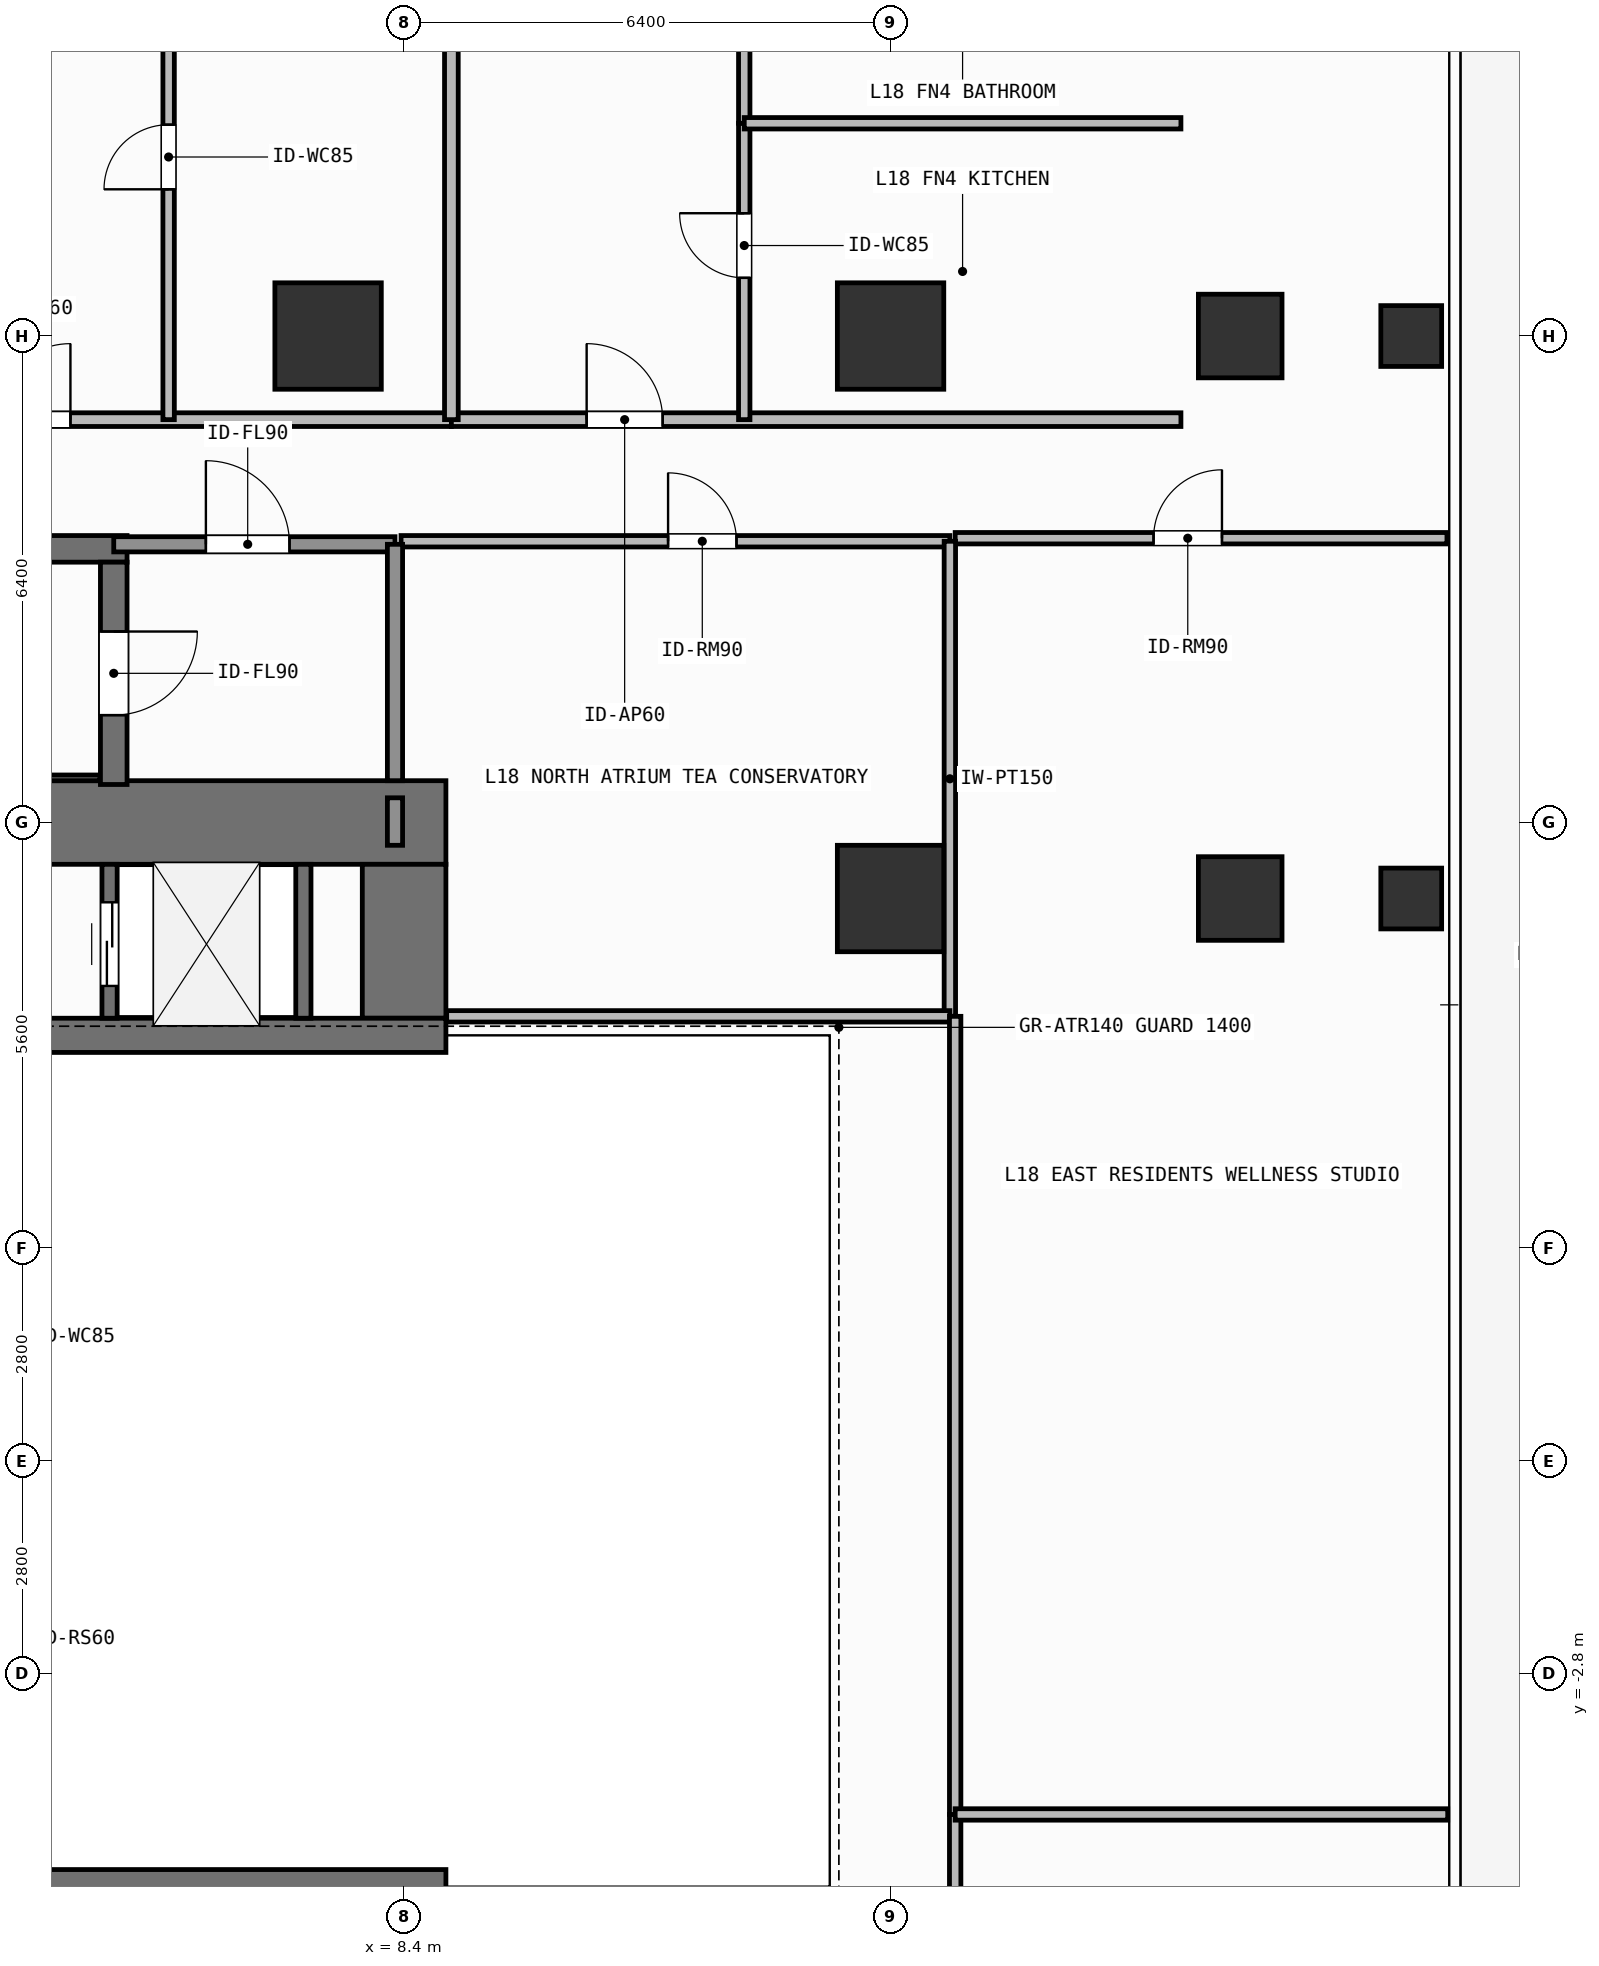
"""IFC4 building model, lengths in metres.
Left out: names, types, materials, properties, quantities, classifications, styles, units other than length and angle.
Written with IfcOpenShell. Run it as: python <this file> out.ifc"""

import sys

from ifc_helpers import new_model, si_unit, direction, frame, frame_2d, origin, origin_2d, place, context, subcontext, project, spatial, rectangle, hollow_rectangle, extrude, element, fill, save


model = new_model("IFC4")
c1 = context("Model", 3, precision=1e-05, world=origin(), true_north=direction((0.0, 1.0)))
c2 = subcontext(c1, "Body", "Model", "MODEL_VIEW")
j1 = project(units=[si_unit("LENGTHUNIT", "METRE"), si_unit("PLANEANGLEUNIT", "RADIAN")], contexts=[c1])
p1 = place(None, origin())
s1 = spatial("IfcSite", under=j1, at=p1, CompositionType="ELEMENT")
p2 = place(p1, origin())
s2 = spatial("IfcBuilding", under=s1, at=p2, CompositionType="ELEMENT")
p3 = place(p2, frame((0.0, 0.0, 69.6)))
s3 = spatial("IfcBuildingStorey", under=s2, at=p3, CompositionType="ELEMENT", Elevation=69.6)
p4 = place(p3, frame((-7.55, 8.4, 0.0), z_axis=(0.0, 0.0, 1.0), x_axis=(1.0, 0.0, 0.0)))
e1 = element("IfcWall", 1, at=p4, inside=s3, PredefinedType="SHEAR", context=c2, shape_type="SweptSolid", body=[
    extrude(rectangle(XDim=16.5, YDim=1.1, at=frame_2d((8.25, 0.0))), origin(), (0.0, 0.0, 1.0), 3.9),
])
p5 = place(p3, frame((8.4, 5.825, 0.0), z_axis=(0.0, 0.0, 1.0), x_axis=(0.0, 1.0, 0.0)))
e2 = element("IfcWall", 2, at=p5, inside=s3, PredefinedType="SHEAR", context=c2, shape_type="SweptSolid", body=[
    extrude(rectangle(XDim=2.025, YDim=1.1, at=frame_2d((1.013, 0.0))), origin(), (0.0, 0.0, 1.0), 3.9),
])
for number, where, z_axis, x_axis in (
    (3, (3.045, -5.6, 0.0), (0.0, 0.0, 1.0), (1.0, 0.0, 0.0)),
    (4, (3.045, 5.6, 0.0), (0.0, 0.0, 1.0), (1.0, 0.0, 0.0)),
):
    element("IfcWall", number, at=place(p3, frame(where, z_axis=z_axis, x_axis=x_axis)), inside=s3, PredefinedType="SHEAR", context=c2, shape_type="SweptSolid", body=[
        extrude(rectangle(XDim=5.905, YDim=0.45, at=frame_2d((2.953, 0.0))), origin(), (0.0, 0.0, 1.0), 3.9),
    ])
p6 = place(p3, frame((-2.555, 12.0, 0.0), z_axis=(0.0, 0.0, 1.0), x_axis=(1.0, 0.0, 0.0)))
e5 = element("IfcWall", 5, at=p6, inside=s3, PredefinedType="SHEAR", context=c2, shape_type="SweptSolid", body=[
    extrude(rectangle(XDim=7.31, YDim=0.35, at=frame_2d((3.655, 0.0))), origin(), (0.0, 0.0, 1.0), 3.9),
])
p7 = place(p3, frame((-2.2, 8.988, 0.0), z_axis=(0.0, 0.0, 1.0), x_axis=(1.0, 0.0, 0.0)))
e6 = element("IfcWall", 6, at=p7, inside=s3, PredefinedType="SHEAR", context=c2, shape_type="SweptSolid", body=[
    extrude(rectangle(XDim=6.6, YDim=0.075, at=frame_2d((3.3, 0.0))), origin(), (0.0, 0.0, 1.0), 3.9),
])
p8 = place(p3, frame((4.58, 11.825, 0.0), z_axis=(0.0, 0.0, 1.0), x_axis=(0.0, -1.0, 0.0)))
e7 = element("IfcWall", 7, at=p8, inside=s3, PredefinedType="SHEAR", context=c2, shape_type="SweptSolid", body=[
    extrude(rectangle(XDim=2.925, YDim=0.35, at=frame_2d((1.462, 0.0))), origin(), (0.0, 0.0, 1.0), 3.9),
])
p9 = place(p8, frame((0.913, 0.0, 0.0)))
e8 = element("IfcOpeningElement", 8, at=p9, cuts=e7, PredefinedType="OPENING", context=c2, shape_type="SweptSolid", body=[
    extrude(rectangle(XDim=1.1, YDim=2.15, at=frame_2d((0.55, 1.075))), frame((0.0, 0.185, 0.0), z_axis=(0.0, -1.0, 0.0), x_axis=(1.0, 0.0, 0.0)), (0.0, 0.0, 1.0), 0.37),
])
for number, where, z_axis, x_axis in (
    (9, (7.4, 14.8, 0.0), (0.0, 0.0, 1.0), (1.0, 0.0, 0.0)),
    (10, (14.8, 14.8, 0.0), (0.0, 0.0, 1.0), (1.0, 0.0, 0.0)),
    (11, (14.8, 7.4, 0.0), (0.0, 0.0, 1.0), (1.0, 0.0, 0.0)),
):
    element("IfcColumn", number, at=place(p3, frame(where, z_axis=z_axis, x_axis=x_axis)), inside=s3, PredefinedType="COLUMN", context=c2, shape_type="SweptSolid", body=[
        extrude(rectangle(XDim=1.4, YDim=1.4, at=origin_2d()), origin(), (0.0, 0.0, 1.0), 3.9),
    ])
for number, where, z_axis, x_axis in (
    (12, (19.4, 7.4, 0.0), (0.0, 0.0, 1.0), (1.0, 0.0, 0.0)),
    (13, (19.4, 14.8, 0.0), (0.0, 0.0, 1.0), (1.0, 0.0, 0.0)),
):
    element("IfcColumn", number, at=place(p3, frame(where, z_axis=z_axis, x_axis=x_axis)), inside=s3, PredefinedType="COLUMN", context=c2, shape_type="SweptSolid", body=[
        extrude(rectangle(XDim=1.1, YDim=1.1, at=origin_2d()), origin(), (0.0, 0.0, 1.0), 3.9),
    ])
for number, where, z_axis, x_axis in (
    (14, (21.65, 7.4, 0.0), (0.0, 0.0, 1.0), (1.0, 0.0, 0.0)),
    (15, (21.65, 14.8, 0.0), (0.0, 0.0, 1.0), (1.0, 0.0, 0.0)),
):
    element("IfcColumn", number, at=place(p3, frame(where, z_axis=z_axis, x_axis=x_axis)), inside=s3, PredefinedType="COLUMN", context=c2, shape_type="SweptSolid", body=[
        extrude(hollow_rectangle(XDim=0.8, YDim=0.8, WallThickness=0.036, at=origin_2d()), origin(), (0.0, 0.0, 1.0), 3.9),
    ])
p10 = place(p3, frame((4.525, 5.825, 0.0), z_axis=(0.0, 0.0, 1.0), x_axis=(0.0, 1.0, 0.0)))
e16 = element("IfcWall", 16, at=p10, inside=s3, PredefinedType="SHEAR", context=c2, shape_type="SweptSolid", body=[
    extrude(rectangle(XDim=2.025, YDim=0.2, at=frame_2d((1.013, 0.0))), origin(), (0.0, 0.0, 1.0), 3.68),
])
p11 = place(p10, frame((0.425, 0.0, 0.0)))
e17 = element("IfcOpeningElement", 17, at=p11, cuts=e16, PredefinedType="OPENING", context=c2, shape_type="SweptSolid", body=[
    extrude(rectangle(XDim=1.1, YDim=2.2, at=frame_2d((0.55, 1.1))), frame((0.0, 0.11, 0.0), z_axis=(0.0, -1.0, 0.0), x_axis=(1.0, 0.0, 0.0)), (0.0, 0.0, 1.0), 0.22),
])
p12 = place(p3, frame((7.075, 5.825, 0.0), z_axis=(0.0, 0.0, 1.0), x_axis=(0.0, 1.0, 0.0)))
e18 = element("IfcWall", 18, at=p12, inside=s3, PredefinedType="SHEAR", context=c2, shape_type="SweptSolid", body=[
    extrude(rectangle(XDim=2.025, YDim=0.2, at=frame_2d((1.013, 0.0))), origin(), (0.0, 0.0, 1.0), 3.68),
])
p13 = place(p3, frame((4.58, 12.06, 0.0), z_axis=(0.0, 0.0, 1.0), x_axis=(1.0, 0.0, 0.0)))
e19 = element("IfcWall", 19, at=p13, inside=s3, PredefinedType="SOLIDWALL", context=c2, shape_type="SweptSolid", body=[
    extrude(rectangle(XDim=3.7, YDim=0.2, at=frame_2d((1.85, 0.0))), origin(), (0.0, 0.0, 1.0), 3.68),
])
p14 = place(p13, frame((1.212, 0.0, 0.0)))
e20 = element("IfcOpeningElement", 20, at=p14, cuts=e19, PredefinedType="OPENING", context=c2, shape_type="SweptSolid", body=[
    extrude(rectangle(XDim=1.1, YDim=2.15, at=frame_2d((0.55, 1.075))), frame((0.0, 0.11, 0.0), z_axis=(0.0, -1.0, 0.0), x_axis=(1.0, 0.0, 0.0)), (0.0, 0.0, 1.0), 0.22),
])
p15 = place(p3, frame((8.36, 12.1, 0.0), z_axis=(0.0, 0.0, 1.0), x_axis=(1.0, 0.0, 0.0)))
e21 = element("IfcWall", 21, at=p15, inside=s3, PredefinedType="PARTITIONING", context=c2, shape_type="SweptSolid", body=[
    extrude(rectangle(XDim=7.22, YDim=0.15, at=frame_2d((3.61, 0.0))), origin(), (0.0, 0.0, 1.0), 3.68),
])
p16 = place(p15, frame((3.513, 0.0, 0.0)))
e22 = element("IfcOpeningElement", 22, at=p16, cuts=e21, PredefinedType="OPENING", context=c2, shape_type="SweptSolid", body=[
    extrude(rectangle(XDim=0.9, YDim=2.1, at=frame_2d((0.45, 1.05))), frame((0.0, 0.085, 0.0), z_axis=(0.0, -1.0, 0.0), x_axis=(1.0, 0.0, 0.0)), (0.0, 0.0, 1.0), 0.17),
])
p17 = place(p3, frame((-2.9, 13.7, 0.0), z_axis=(0.0, 0.0, 1.0), x_axis=(1.0, 0.0, 0.0)))
e23 = element("IfcWall", 23, at=p17, inside=s3, PredefinedType="PARTITIONING", context=c2, shape_type="SweptSolid", body=[
    extrude(rectangle(XDim=11.922, YDim=0.18, at=frame_2d((5.961, 0.0))), origin(), (0.0, 0.0, 1.0), 3.68),
])
p18 = place(p17, frame((5.91, 0.0, 0.0)))
e24 = element("IfcOpeningElement", 24, at=p18, cuts=e23, PredefinedType="OPENING", context=c2, shape_type="SweptSolid", body=[
    extrude(rectangle(XDim=1.0, YDim=2.2, at=frame_2d((0.5, 1.1))), frame((0.0, 0.1, 0.0), z_axis=(0.0, -1.0, 0.0), x_axis=(1.0, 0.0, 0.0)), (0.0, 0.0, 1.0), 0.2),
])
p19 = place(p3, frame((5.302, 13.7, 0.0), z_axis=(0.0, 0.0, 1.0), x_axis=(0.0, 1.0, 0.0)))
e25 = element("IfcWall", 25, at=p19, inside=s3, PredefinedType="PARTITIONING", context=c2, shape_type="SweptSolid", body=[
    extrude(rectangle(XDim=7.09, YDim=0.15, at=frame_2d((3.545, 0.0))), origin(), (0.0, 0.0, 1.0), 3.68),
])
p20 = place(p19, frame((3.03, 0.0, 0.0)))
e26 = element("IfcOpeningElement", 26, at=p20, cuts=e25, PredefinedType="OPENING", context=c2, shape_type="SweptSolid", body=[
    extrude(rectangle(XDim=0.85, YDim=2.1, at=frame_2d((0.425, 1.05))), frame((0.0, 0.085, 0.0), z_axis=(0.0, -1.0, 0.0), x_axis=(1.0, 0.0, 0.0)), (0.0, 0.0, 1.0), 0.17),
])
p21 = place(p3, frame((9.022, 13.7, 0.0), z_axis=(0.0, 0.0, 1.0), x_axis=(1.0, 0.0, 0.0)))
e27 = element("IfcWall", 27, at=p21, inside=s3, PredefinedType="PARTITIONING", context=c2, shape_type="SweptSolid", body=[
    extrude(rectangle(XDim=9.598, YDim=0.18, at=frame_2d((4.799, 0.0))), origin(), (0.0, 0.0, 1.0), 3.68),
])
p22 = place(p21, frame((1.78, 0.0, 0.0)))
e28 = element("IfcOpeningElement", 28, at=p22, cuts=e27, PredefinedType="OPENING", context=c2, shape_type="SweptSolid", body=[
    extrude(rectangle(XDim=1.0, YDim=2.2, at=frame_2d((0.5, 1.1))), frame((0.0, 0.1, 0.0), z_axis=(0.0, -1.0, 0.0), x_axis=(1.0, 0.0, 0.0)), (0.0, 0.0, 1.0), 0.2),
])
p23 = place(p3, frame((12.875, 13.7, 0.0), z_axis=(0.0, 0.0, 1.0), x_axis=(0.0, 1.0, 0.0)))
e29 = element("IfcWall", 29, at=p23, inside=s3, PredefinedType="PARTITIONING", context=c2, shape_type="SweptSolid", body=[
    extrude(rectangle(XDim=3.899, YDim=0.15, at=frame_2d((1.95, 0.0))), origin(), (0.0, 0.0, 1.0), 3.68),
])
p24 = place(p23, frame((1.865, 0.0, 0.0)))
e30 = element("IfcOpeningElement", 30, at=p24, cuts=e29, PredefinedType="OPENING", context=c2, shape_type="SweptSolid", body=[
    extrude(rectangle(XDim=0.85, YDim=2.1, at=frame_2d((0.425, 1.05))), frame((0.0, 0.085, 0.0), z_axis=(0.0, -1.0, 0.0), x_axis=(1.0, 0.0, 0.0)), (0.0, 0.0, 1.0), 0.17),
])
p25 = place(p3, frame((12.875, 17.599, 0.0), z_axis=(0.0, 0.0, 1.0), x_axis=(0.0, 1.0, 0.0)))
e31 = element("IfcWall", 31, at=p25, inside=s3, PredefinedType="PARTITIONING", context=c2, shape_type="SweptSolid", body=[
    extrude(rectangle(XDim=3.191, YDim=0.15, at=frame_2d((1.595, 0.0))), origin(), (0.0, 0.0, 1.0), 3.68),
])
p26 = place(p25, frame((1.002, 0.0, 0.0)))
e32 = element("IfcOpeningElement", 32, at=p26, cuts=e31, PredefinedType="OPENING", context=c2, shape_type="SweptSolid", body=[
    extrude(rectangle(XDim=0.85, YDim=2.1, at=frame_2d((0.425, 1.05))), frame((0.0, 0.085, 0.0), z_axis=(0.0, -1.0, 0.0), x_axis=(1.0, 0.0, 0.0)), (0.0, 0.0, 1.0), 0.17),
])
p27 = place(p3, frame((15.65, 12.14, 0.0), z_axis=(0.0, 0.0, 1.0), x_axis=(1.0, 0.0, 0.0)))
e33 = element("IfcWall", 33, at=p27, inside=s3, PredefinedType="PARTITIONING", context=c2, shape_type="SweptSolid", body=[
    extrude(rectangle(XDim=6.47, YDim=0.15, at=frame_2d((3.235, 0.0))), origin(), (0.0, 0.0, 1.0), 3.68),
])
p28 = place(p27, frame((2.61, 0.0, 0.0)))
e34 = element("IfcOpeningElement", 34, at=p28, cuts=e33, PredefinedType="OPENING", context=c2, shape_type="SweptSolid", body=[
    extrude(rectangle(XDim=0.9, YDim=2.1, at=frame_2d((0.45, 1.05))), frame((0.0, 0.085, 0.0), z_axis=(0.0, -1.0, 0.0), x_axis=(1.0, 0.0, 0.0)), (0.0, 0.0, 1.0), 0.17),
])
p29 = place(p3, frame((8.28, 8.95, 0.0), z_axis=(0.0, 0.0, 1.0), x_axis=(0.0, 1.0, 0.0)))
e35 = element("IfcWall", 35, at=p29, inside=s3, PredefinedType="SOLIDWALL", context=c2, shape_type="SweptSolid", body=[
    extrude(rectangle(XDim=3.11, YDim=0.2, at=frame_2d((1.555, 0.0))), origin(), (0.0, 0.0, 1.0), 3.68),
])
p30 = place(p3, frame((8.28, 8.1, 0.0), z_axis=(0.0, 0.0, 1.0), x_axis=(0.0, 1.0, 0.0)))
e36 = element("IfcWall", 36, at=p30, inside=s3, PredefinedType="SOLIDWALL", context=c2, shape_type="SweptSolid", body=[
    extrude(rectangle(XDim=0.625, YDim=0.2, at=frame_2d((0.312, 0.0))), origin(), (0.0, 0.0, 1.0), 3.68),
])
p31 = place(p3, frame((15.58, 5.85, 0.0), z_axis=(0.0, 0.0, 1.0), x_axis=(0.0, 1.0, 0.0)))
e37 = element("IfcWall", 37, at=p31, inside=s3, PredefinedType="PARTITIONING", context=c2, shape_type="SweptSolid", body=[
    extrude(rectangle(XDim=6.25, YDim=0.15, at=frame_2d((3.125, 0.0))), origin(), (0.0, 0.0, 1.0), 3.68),
])
p32 = place(p3, frame((8.96, 5.85, 0.0), z_axis=(0.0, 0.0, 1.0), x_axis=(1.0, 0.0, 0.0)))
e38 = element("IfcWall", 38, at=p32, inside=s3, PredefinedType="PARTITIONING", context=c2, shape_type="SweptSolid", body=[
    extrude(rectangle(XDim=6.62, YDim=0.15, at=frame_2d((3.31, 0.0))), origin(), (0.0, 0.0, 1.0), 3.68),
])
p33 = place(p3, frame((12.875, 17.599, 0.0), z_axis=(0.0, 0.0, 1.0), x_axis=(1.0, 0.0, 0.0)))
e39 = element("IfcWall", 39, at=p33, inside=s3, PredefinedType="PARTITIONING", context=c2, shape_type="SweptSolid", body=[
    extrude(rectangle(XDim=5.745, YDim=0.15, at=frame_2d((2.873, 0.0))), origin(), (0.0, 0.0, 1.0), 3.68),
])
p34 = place(p3, frame((9.022, 13.7, 0.0), z_axis=(0.0, 0.0, 1.0), x_axis=(0.0, 1.0, 0.0)))
e40 = element("IfcWall", 40, at=p34, inside=s3, PredefinedType="PARTITIONING", context=c2, shape_type="SweptSolid", body=[
    extrude(rectangle(XDim=11.33, YDim=0.18, at=frame_2d((5.665, 0.0))), origin(), (0.0, 0.0, 1.0), 3.68),
])
p35 = place(p3, frame((15.65, -5.85, 0.0), z_axis=(0.0, 0.0, 1.0), x_axis=(0.0, 1.0, 0.0)))
e41 = element("IfcWall", 41, at=p35, inside=s3, PredefinedType="PARTITIONING", context=c2, shape_type="SweptSolid", body=[
    extrude(rectangle(XDim=1.2, YDim=0.15, at=frame_2d((0.6, 0.0))), origin(), (0.0, 0.0, 1.0), 3.68),
])
p36 = place(p3, frame((15.65, -4.65, 0.0), z_axis=(0.0, 0.0, 1.0), x_axis=(0.0, 1.0, 0.0)))
e42 = element("IfcWall", 42, at=p36, inside=s3, PredefinedType="PARTITIONING", context=c2, shape_type="SweptSolid", body=[
    extrude(rectangle(XDim=10.5, YDim=0.15, at=frame_2d((5.25, 0.0))), origin(), (0.0, 0.0, 1.0), 3.68),
])
p37 = place(p3, frame((15.65, -4.65, 0.0), z_axis=(0.0, 0.0, 1.0), x_axis=(1.0, 0.0, 0.0)))
e43 = element("IfcWall", 43, at=p37, inside=s3, PredefinedType="PARTITIONING", context=c2, shape_type="SweptSolid", body=[
    extrude(rectangle(XDim=6.48, YDim=0.15, at=frame_2d((3.24, 0.0))), origin(), (0.0, 0.0, 1.0), 3.68),
])
p38 = place(p11, origin())
e44 = element("IfcDoor", 44, at=p38, inside=s3, OperationType="SLIDING_TO_LEFT", PredefinedType="DOOR", context=c2, shape_type="SweptSolid", body=[
    extrude(rectangle(XDim=1.1, YDim=2.2, at=frame_2d((0.55, 1.1))), frame((0.0, 0.025, 0.0), z_axis=(0.0, -1.0, 0.0), x_axis=(1.0, 0.0, 0.0)), (0.0, 0.0, 1.0), 0.05),
])
fill(e17, e44)
p39 = place(p9, origin())
e45 = element("IfcDoor", 45, at=p39, inside=s3, OperationType="SINGLE_SWING_LEFT", PredefinedType="DOOR", context=c2, shape_type="SweptSolid", body=[
    extrude(rectangle(XDim=1.1, YDim=2.15, at=frame_2d((0.55, 1.075))), frame((0.0, 0.025, 0.0), z_axis=(0.0, -1.0, 0.0), x_axis=(1.0, 0.0, 0.0)), (0.0, 0.0, 1.0), 0.05),
])
fill(e8, e45)
p40 = place(p14, origin())
e46 = element("IfcDoor", 46, at=p40, inside=s3, OperationType="SINGLE_SWING_LEFT", PredefinedType="DOOR", context=c2, shape_type="SweptSolid", body=[
    extrude(rectangle(XDim=1.1, YDim=2.15, at=frame_2d((0.55, 1.075))), frame((0.0, 0.025, 0.0), z_axis=(0.0, -1.0, 0.0), x_axis=(1.0, 0.0, 0.0)), (0.0, 0.0, 1.0), 0.05),
])
fill(e20, e46)
p41 = place(p16, origin())
e47 = element("IfcDoor", 47, at=p41, inside=s3, OperationType="SINGLE_SWING_LEFT", PredefinedType="DOOR", context=c2, shape_type="SweptSolid", body=[
    extrude(rectangle(XDim=0.9, YDim=2.1, at=frame_2d((0.45, 1.05))), frame((0.0, 0.025, 0.0), z_axis=(0.0, -1.0, 0.0), x_axis=(1.0, 0.0, 0.0)), (0.0, 0.0, 1.0), 0.05),
])
fill(e22, e47)
p42 = place(p18, origin())
e48 = element("IfcDoor", 48, at=p42, inside=s3, OperationType="SINGLE_SWING_RIGHT", PredefinedType="DOOR", context=c2, shape_type="SweptSolid", body=[
    extrude(rectangle(XDim=1.0, YDim=2.2, at=frame_2d((0.5, 1.1))), frame((0.0, 0.025, 0.0), z_axis=(0.0, -1.0, 0.0), x_axis=(1.0, 0.0, 0.0)), (0.0, 0.0, 1.0), 0.05),
])
fill(e24, e48)
p43 = place(p20, origin())
e49 = element("IfcDoor", 49, at=p43, inside=s3, OperationType="SINGLE_SWING_LEFT", PredefinedType="DOOR", context=c2, shape_type="SweptSolid", body=[
    extrude(rectangle(XDim=0.85, YDim=2.1, at=frame_2d((0.425, 1.05))), frame((0.0, 0.025, 0.0), z_axis=(0.0, -1.0, 0.0), x_axis=(1.0, 0.0, 0.0)), (0.0, 0.0, 1.0), 0.05),
])
fill(e26, e49)
p44 = place(p22, origin())
e50 = element("IfcDoor", 50, at=p44, inside=s3, OperationType="SINGLE_SWING_LEFT", PredefinedType="DOOR", context=c2, shape_type="SweptSolid", body=[
    extrude(rectangle(XDim=1.0, YDim=2.2, at=frame_2d((0.5, 1.1))), frame((0.0, 0.025, 0.0), z_axis=(0.0, -1.0, 0.0), x_axis=(1.0, 0.0, 0.0)), (0.0, 0.0, 1.0), 0.05),
])
fill(e28, e50)
p45 = place(p24, origin())
e51 = element("IfcDoor", 51, at=p45, inside=s3, OperationType="SINGLE_SWING_RIGHT", PredefinedType="DOOR", context=c2, shape_type="SweptSolid", body=[
    extrude(rectangle(XDim=0.85, YDim=2.1, at=frame_2d((0.425, 1.05))), frame((0.0, 0.025, 0.0), z_axis=(0.0, -1.0, 0.0), x_axis=(1.0, 0.0, 0.0)), (0.0, 0.0, 1.0), 0.05),
])
fill(e30, e51)
p46 = place(p28, origin())
e52 = element("IfcDoor", 52, at=p46, inside=s3, OperationType="SINGLE_SWING_RIGHT", PredefinedType="DOOR", context=c2, shape_type="SweptSolid", body=[
    extrude(rectangle(XDim=0.9, YDim=2.1, at=frame_2d((0.45, 1.05))), frame((0.0, 0.025, 0.0), z_axis=(0.0, -1.0, 0.0), x_axis=(1.0, 0.0, 0.0)), (0.0, 0.0, 1.0), 0.05),
])
fill(e34, e52)
save(model, sys.argv[1])
